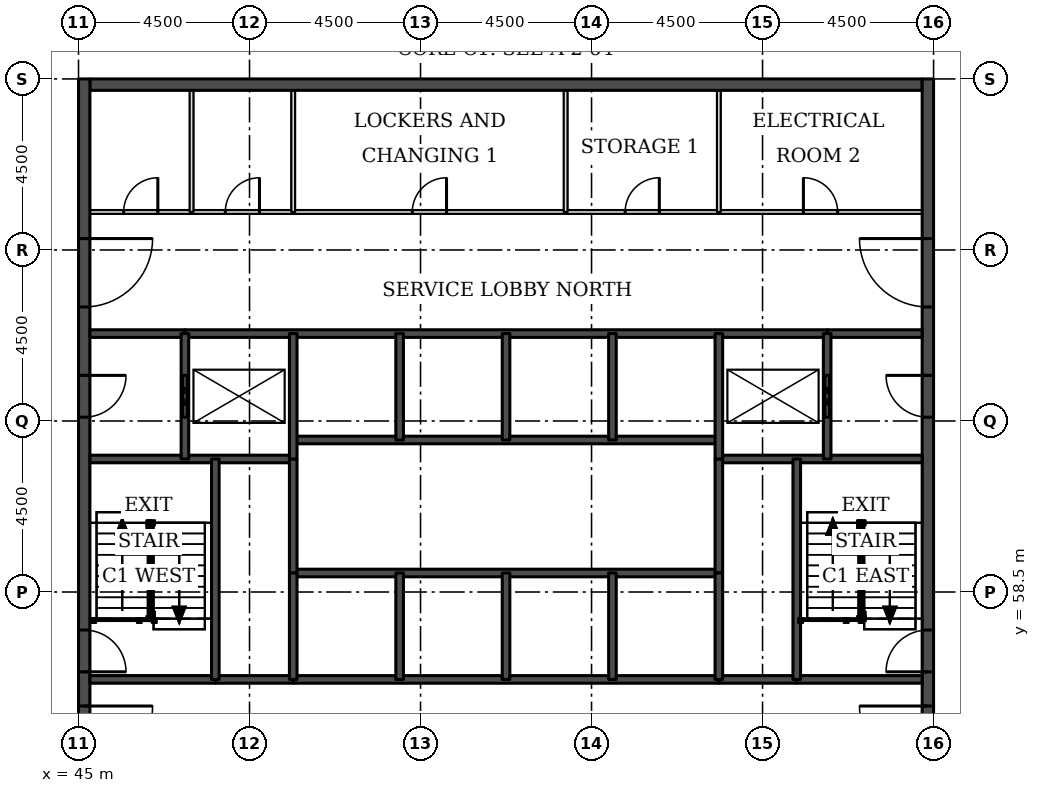
"""IFC4 building model, lengths in metres.
Left out: names, types, materials, properties, quantities, classifications, styles, units other than length and angle.
Written with IfcOpenShell. Run it as: python <this file> out.ifc"""

import sys

from ifc_helpers import new_model, si_unit, direction, frame, frame_2d, origin, place, context, subcontext, project, spatial, rectangle, extrude, element, fill, save


model = new_model("IFC4")
c1 = context("Model", 3, precision=1e-05, world=origin(), true_north=direction((0.0, 1.0)))
c2 = subcontext(c1, "Body", "Model", "MODEL_VIEW")
j1 = project(units=[si_unit("LENGTHUNIT", "METRE"), si_unit("PLANEANGLEUNIT", "RADIAN")], contexts=[c1])
p1 = place(None, origin())
s1 = spatial("IfcSite", under=j1, at=p1, CompositionType="ELEMENT")
p2 = place(p1, origin())
s2 = spatial("IfcBuilding", under=s1, at=p2, CompositionType="ELEMENT")
p3 = place(p2, frame((0.0, 0.0, 263.7)))
s3 = spatial("IfcBuildingStorey", under=s2, at=p3, CompositionType="ELEMENT", Elevation=263.7)
p4 = place(p3, frame((45.3, 71.85, 0.0), z_axis=(0.0, 0.0, 1.0), x_axis=(1.0, 0.0, 0.0)))
e1 = element("IfcWall", 1, at=p4, inside=s3, PredefinedType="SHEAR", context=c2, shape_type="SweptSolid", body=[
    extrude(rectangle(XDim=21.9, YDim=0.3, at=frame_2d((10.95, 0.0))), origin(), (0.0, 0.0, 1.0), 5.0),
])
p5 = place(p3, frame((45.15, 49.5, 0.0), z_axis=(0.0, 0.0, 1.0), x_axis=(0.0, 1.0, 0.0)))
e2 = element("IfcWall", 2, at=p5, inside=s3, PredefinedType="SHEAR", context=c2, shape_type="SweptSolid", body=[
    extrude(rectangle(XDim=22.5, YDim=0.3, at=frame_2d((11.25, 0.0))), origin(), (0.0, 0.0, 1.0), 5.0),
])
p6 = place(p5, frame((4.2, 0.0, 0.0)))
e3 = element("IfcOpeningElement", 3, at=p6, cuts=e2, PredefinedType="OPENING", context=c2, shape_type="SweptSolid", body=[
    extrude(rectangle(XDim=1.8, YDim=2.1, at=frame_2d((0.9, 1.05))), frame((0.0, 0.16, 0.0), z_axis=(0.0, -1.0, 0.0), x_axis=(1.0, 0.0, 0.0)), (0.0, 0.0, 1.0), 0.32),
])
p7 = place(p5, frame((6.9, 0.0, 0.0)))
e4 = element("IfcOpeningElement", 4, at=p7, cuts=e2, PredefinedType="OPENING", context=c2, shape_type="SweptSolid", body=[
    extrude(rectangle(XDim=1.1, YDim=2.1, at=frame_2d((0.55, 1.05))), frame((0.0, 0.16, 0.0), z_axis=(0.0, -1.0, 0.0), x_axis=(1.0, 0.0, 0.0)), (0.0, 0.0, 1.0), 0.32),
])
p8 = place(p5, frame((13.6, 0.0, 0.0)))
e5 = element("IfcOpeningElement", 5, at=p8, cuts=e2, PredefinedType="OPENING", context=c2, shape_type="SweptSolid", body=[
    extrude(rectangle(XDim=1.1, YDim=2.1, at=frame_2d((0.55, 1.05))), frame((0.0, 0.16, 0.0), z_axis=(0.0, -1.0, 0.0), x_axis=(1.0, 0.0, 0.0)), (0.0, 0.0, 1.0), 0.32),
])
p9 = place(p5, frame((16.5, 0.0, 0.0)))
e6 = element("IfcOpeningElement", 6, at=p9, cuts=e2, PredefinedType="OPENING", context=c2, shape_type="SweptSolid", body=[
    extrude(rectangle(XDim=1.8, YDim=2.1, at=frame_2d((0.9, 1.05))), frame((0.0, 0.16, 0.0), z_axis=(0.0, -1.0, 0.0), x_axis=(1.0, 0.0, 0.0)), (0.0, 0.0, 1.0), 0.32),
])
p10 = place(p3, frame((67.35, 49.5, 0.0), z_axis=(0.0, 0.0, 1.0), x_axis=(0.0, 1.0, 0.0)))
e7 = element("IfcWall", 7, at=p10, inside=s3, PredefinedType="SHEAR", context=c2, shape_type="SweptSolid", body=[
    extrude(rectangle(XDim=22.5, YDim=0.3, at=frame_2d((11.25, 0.0))), origin(), (0.0, 0.0, 1.0), 5.0),
])
p11 = place(p10, frame((4.2, 0.0, 0.0)))
e8 = element("IfcOpeningElement", 8, at=p11, cuts=e7, PredefinedType="OPENING", context=c2, shape_type="SweptSolid", body=[
    extrude(rectangle(XDim=1.8, YDim=2.1, at=frame_2d((0.9, 1.05))), frame((0.0, 0.16, 0.0), z_axis=(0.0, -1.0, 0.0), x_axis=(1.0, 0.0, 0.0)), (0.0, 0.0, 1.0), 0.32),
])
p12 = place(p10, frame((6.9, 0.0, 0.0)))
e9 = element("IfcOpeningElement", 9, at=p12, cuts=e7, PredefinedType="OPENING", context=c2, shape_type="SweptSolid", body=[
    extrude(rectangle(XDim=1.1, YDim=2.1, at=frame_2d((0.55, 1.05))), frame((0.0, 0.16, 0.0), z_axis=(0.0, -1.0, 0.0), x_axis=(1.0, 0.0, 0.0)), (0.0, 0.0, 1.0), 0.32),
])
p13 = place(p10, frame((13.6, 0.0, 0.0)))
e10 = element("IfcOpeningElement", 10, at=p13, cuts=e7, PredefinedType="OPENING", context=c2, shape_type="SweptSolid", body=[
    extrude(rectangle(XDim=1.1, YDim=2.1, at=frame_2d((0.55, 1.05))), frame((0.0, 0.16, 0.0), z_axis=(0.0, -1.0, 0.0), x_axis=(1.0, 0.0, 0.0)), (0.0, 0.0, 1.0), 0.32),
])
p14 = place(p10, frame((16.5, 0.0, 0.0)))
e11 = element("IfcOpeningElement", 11, at=p14, cuts=e7, PredefinedType="OPENING", context=c2, shape_type="SweptSolid", body=[
    extrude(rectangle(XDim=1.8, YDim=2.1, at=frame_2d((0.9, 1.05))), frame((0.0, 0.16, 0.0), z_axis=(0.0, -1.0, 0.0), x_axis=(1.0, 0.0, 0.0)), (0.0, 0.0, 1.0), 0.32),
])
for number, where, z_axis, x_axis in (
    (12, (48.6, 56.2, 0.0), (0.0, 0.0, 1.0), (1.0, 0.0, 0.0)),
    (13, (61.85, 56.2, 0.0), (0.0, 0.0, 1.0), (1.0, 0.0, 0.0)),
):
    element("IfcWall", number, at=place(p3, frame(where, z_axis=z_axis, x_axis=x_axis)), inside=s3, PredefinedType="SOLIDWALL", context=c2, shape_type="SweptSolid", body=[
        extrude(rectangle(XDim=2.05, YDim=0.2, at=frame_2d((1.025, 0.0))), origin(), (0.0, 0.0, 1.0), 4.75),
    ])
p15 = place(p3, frame((45.3, 56.2, 0.0), z_axis=(0.0, 0.0, 1.0), x_axis=(1.0, 0.0, 0.0)))
e14 = element("IfcWall", 14, at=p15, inside=s3, PredefinedType="SOLIDWALL", context=c2, shape_type="SweptSolid", body=[
    extrude(rectangle(XDim=3.3, YDim=0.2, at=frame_2d((1.65, 0.0))), origin(), (0.0, 0.0, 1.0), 4.75),
])
p16 = place(p3, frame((50.65, 56.2, 0.0), z_axis=(0.0, 0.0, 1.0), x_axis=(1.0, 0.0, 0.0)))
e15 = element("IfcWall", 15, at=p16, inside=s3, PredefinedType="SOLIDWALL", context=c2, shape_type="SweptSolid", body=[
    extrude(rectangle(XDim=11.2, YDim=0.2, at=frame_2d((5.6, 0.0))), origin(), (0.0, 0.0, 1.0), 4.75),
])
p17 = place(p3, frame((63.9, 56.2, 0.0), z_axis=(0.0, 0.0, 1.0), x_axis=(1.0, 0.0, 0.0)))
e16 = element("IfcWall", 16, at=p17, inside=s3, PredefinedType="SOLIDWALL", context=c2, shape_type="SweptSolid", body=[
    extrude(rectangle(XDim=3.3, YDim=0.2, at=frame_2d((1.65, 0.0))), origin(), (0.0, 0.0, 1.0), 4.75),
])
p18 = place(p3, frame((50.65, 59.0, 0.0), z_axis=(0.0, 0.0, 1.0), x_axis=(1.0, 0.0, 0.0)))
e17 = element("IfcWall", 17, at=p18, inside=s3, PredefinedType="SOLIDWALL", context=c2, shape_type="SweptSolid", body=[
    extrude(rectangle(XDim=11.2, YDim=0.2, at=frame_2d((5.6, 0.0))), origin(), (0.0, 0.0, 1.0), 4.75),
])
for number, where, z_axis, x_axis in (
    (18, (45.3, 62.0, 0.0), (0.0, 0.0, 1.0), (1.0, 0.0, 0.0)),
    (19, (61.85, 62.0, 0.0), (0.0, 0.0, 1.0), (1.0, 0.0, 0.0)),
):
    element("IfcWall", number, at=place(p3, frame(where, z_axis=z_axis, x_axis=x_axis)), inside=s3, PredefinedType="SOLIDWALL", context=c2, shape_type="SweptSolid", body=[
        extrude(rectangle(XDim=5.35, YDim=0.2, at=frame_2d((2.675, 0.0))), origin(), (0.0, 0.0, 1.0), 4.75),
    ])
p19 = place(p3, frame((50.65, 62.5, 0.0), z_axis=(0.0, 0.0, 1.0), x_axis=(1.0, 0.0, 0.0)))
e20 = element("IfcWall", 20, at=p19, inside=s3, PredefinedType="SOLIDWALL", context=c2, shape_type="SweptSolid", body=[
    extrude(rectangle(XDim=11.2, YDim=0.2, at=frame_2d((5.6, 0.0))), origin(), (0.0, 0.0, 1.0), 4.75),
])
for number, where, z_axis, x_axis in (
    (21, (45.3, 65.3, 0.0), (0.0, 0.0, 1.0), (1.0, 0.0, 0.0)),
    (22, (64.7, 65.3, 0.0), (0.0, 0.0, 1.0), (1.0, 0.0, 0.0)),
):
    element("IfcWall", number, at=place(p3, frame(where, z_axis=z_axis, x_axis=x_axis)), inside=s3, PredefinedType="SOLIDWALL", context=c2, shape_type="SweptSolid", body=[
        extrude(rectangle(XDim=2.5, YDim=0.2, at=frame_2d((1.25, 0.0))), origin(), (0.0, 0.0, 1.0), 4.75),
    ])
p20 = place(p3, frame((47.8, 65.3, 0.0), z_axis=(0.0, 0.0, 1.0), x_axis=(1.0, 0.0, 0.0)))
e23 = element("IfcWall", 23, at=p20, inside=s3, PredefinedType="SOLIDWALL", context=c2, shape_type="SweptSolid", body=[
    extrude(rectangle(XDim=16.9, YDim=0.2, at=frame_2d((8.45, 0.0))), origin(), (0.0, 0.0, 1.0), 4.75),
])
p21 = place(p3, frame((45.3, 68.5, 0.0), z_axis=(0.0, 0.0, 1.0), x_axis=(1.0, 0.0, 0.0)))
e24 = element("IfcWall", 24, at=p21, inside=s3, PredefinedType="PARTITIONING", context=c2, shape_type="SweptSolid", body=[
    extrude(rectangle(XDim=21.9, YDim=0.1, at=frame_2d((10.95, 0.0))), origin(), (0.0, 0.0, 1.0), 4.75),
])
p22 = place(p21, frame((18.775, 0.0, 0.0)))
e25 = element("IfcOpeningElement", 25, at=p22, cuts=e24, PredefinedType="OPENING", context=c2, shape_type="SweptSolid", body=[
    extrude(rectangle(XDim=0.9, YDim=2.1, at=frame_2d((0.45, 1.05))), frame((0.0, 0.06, 0.0), z_axis=(0.0, -1.0, 0.0), x_axis=(1.0, 0.0, 0.0)), (0.0, 0.0, 1.0), 0.12),
])
p23 = place(p21, frame((0.887, 0.0, 0.0)))
e26 = element("IfcOpeningElement", 26, at=p23, cuts=e24, PredefinedType="OPENING", context=c2, shape_type="SweptSolid", body=[
    extrude(rectangle(XDim=0.9, YDim=2.1, at=frame_2d((0.45, 1.05))), frame((0.0, 0.06, 0.0), z_axis=(0.0, -1.0, 0.0), x_axis=(1.0, 0.0, 0.0)), (0.0, 0.0, 1.0), 0.12),
])
p24 = place(p21, frame((3.562, 0.0, 0.0)))
e27 = element("IfcOpeningElement", 27, at=p24, cuts=e24, PredefinedType="OPENING", context=c2, shape_type="SweptSolid", body=[
    extrude(rectangle(XDim=0.9, YDim=2.1, at=frame_2d((0.45, 1.05))), frame((0.0, 0.06, 0.0), z_axis=(0.0, -1.0, 0.0), x_axis=(1.0, 0.0, 0.0)), (0.0, 0.0, 1.0), 0.12),
])
p25 = place(p21, frame((14.084, 0.0, 0.0)))
e28 = element("IfcOpeningElement", 28, at=p25, cuts=e24, PredefinedType="OPENING", context=c2, shape_type="SweptSolid", body=[
    extrude(rectangle(XDim=0.9, YDim=2.1, at=frame_2d((0.45, 1.05))), frame((0.0, 0.06, 0.0), z_axis=(0.0, -1.0, 0.0), x_axis=(1.0, 0.0, 0.0)), (0.0, 0.0, 1.0), 0.12),
])
p26 = place(p21, frame((8.484, 0.0, 0.0)))
e29 = element("IfcOpeningElement", 29, at=p26, cuts=e24, PredefinedType="OPENING", context=c2, shape_type="SweptSolid", body=[
    extrude(rectangle(XDim=0.9, YDim=2.1, at=frame_2d((0.45, 1.05))), frame((0.0, 0.06, 0.0), z_axis=(0.0, -1.0, 0.0), x_axis=(1.0, 0.0, 0.0)), (0.0, 0.0, 1.0), 0.12),
])
p27 = place(p3, frame((47.8, 62.0, 0.0), z_axis=(0.0, 0.0, 1.0), x_axis=(0.0, 1.0, 0.0)))
e30 = element("IfcWall", 30, at=p27, inside=s3, PredefinedType="SOLIDWALL", context=c2, shape_type="SweptSolid", body=[
    extrude(rectangle(XDim=3.3, YDim=0.2, at=frame_2d((1.65, 0.0))), origin(), (0.0, 0.0, 1.0), 4.75),
])
p28 = place(p27, frame((1.1, 0.0, 0.0)))
e31 = element("IfcOpeningElement", 31, at=p28, cuts=e30, PredefinedType="OPENING", context=c2, shape_type="SweptSolid", body=[
    extrude(rectangle(XDim=1.1, YDim=2.1, at=frame_2d((0.55, 1.05))), frame((0.0, 0.11, 0.0), z_axis=(0.0, -1.0, 0.0), x_axis=(1.0, 0.0, 0.0)), (0.0, 0.0, 1.0), 0.22),
])
p29 = place(p3, frame((47.975, 68.5, 0.0), z_axis=(0.0, 0.0, 1.0), x_axis=(0.0, 1.0, 0.0)))
e32 = element("IfcWall", 32, at=p29, inside=s3, PredefinedType="PARTITIONING", context=c2, shape_type="SweptSolid", body=[
    extrude(rectangle(XDim=3.2, YDim=0.1, at=frame_2d((1.6, 0.0))), origin(), (0.0, 0.0, 1.0), 4.75),
])
p30 = place(p3, frame((48.6, 56.2, 0.0), z_axis=(0.0, 0.0, 1.0), x_axis=(0.0, 1.0, 0.0)))
e33 = element("IfcWall", 33, at=p30, inside=s3, PredefinedType="SOLIDWALL", context=c2, shape_type="SweptSolid", body=[
    extrude(rectangle(XDim=5.8, YDim=0.2, at=frame_2d((2.9, 0.0))), origin(), (0.0, 0.0, 1.0), 4.75),
])
p31 = place(p3, frame((50.65, 68.5, 0.0), z_axis=(0.0, 0.0, 1.0), x_axis=(0.0, 1.0, 0.0)))
e34 = element("IfcWall", 34, at=p31, inside=s3, PredefinedType="PARTITIONING", context=c2, shape_type="SweptSolid", body=[
    extrude(rectangle(XDim=3.2, YDim=0.1, at=frame_2d((1.6, 0.0))), origin(), (0.0, 0.0, 1.0), 4.75),
])
p32 = place(p3, frame((50.65, 59.0, 0.0), z_axis=(0.0, 0.0, 1.0), x_axis=(0.0, 1.0, 0.0)))
e35 = element("IfcWall", 35, at=p32, inside=s3, PredefinedType="SOLIDWALL", context=c2, shape_type="SweptSolid", body=[
    extrude(rectangle(XDim=3.0, YDim=0.2, at=frame_2d((1.5, 0.0))), origin(), (0.0, 0.0, 1.0), 4.75),
])
p33 = place(p3, frame((50.65, 56.2, 0.0), z_axis=(0.0, 0.0, 1.0), x_axis=(0.0, 1.0, 0.0)))
e36 = element("IfcWall", 36, at=p33, inside=s3, PredefinedType="SOLIDWALL", context=c2, shape_type="SweptSolid", body=[
    extrude(rectangle(XDim=2.8, YDim=0.2, at=frame_2d((1.4, 0.0))), origin(), (0.0, 0.0, 1.0), 4.75),
])
p34 = place(p3, frame((50.65, 62.0, 0.0), z_axis=(0.0, 0.0, 1.0), x_axis=(0.0, 1.0, 0.0)))
e37 = element("IfcWall", 37, at=p34, inside=s3, PredefinedType="SOLIDWALL", context=c2, shape_type="SweptSolid", body=[
    extrude(rectangle(XDim=3.3, YDim=0.2, at=frame_2d((1.65, 0.0))), origin(), (0.0, 0.0, 1.0), 4.75),
])
for number, where, z_axis, x_axis in (
    (38, (53.45, 56.2, 0.0), (0.0, 0.0, 1.0), (0.0, 1.0, 0.0)),
    (39, (53.45, 62.5, 0.0), (0.0, 0.0, 1.0), (0.0, 1.0, 0.0)),
    (40, (56.25, 56.2, 0.0), (0.0, 0.0, 1.0), (0.0, 1.0, 0.0)),
    (41, (56.25, 62.5, 0.0), (0.0, 0.0, 1.0), (0.0, 1.0, 0.0)),
):
    element("IfcWall", number, at=place(p3, frame(where, z_axis=z_axis, x_axis=x_axis)), inside=s3, PredefinedType="SOLIDWALL", context=c2, shape_type="SweptSolid", body=[
        extrude(rectangle(XDim=2.8, YDim=0.2, at=frame_2d((1.4, 0.0))), origin(), (0.0, 0.0, 1.0), 4.75),
    ])
p35 = place(p3, frame((57.818, 68.5, 0.0), z_axis=(0.0, 0.0, 1.0), x_axis=(0.0, 1.0, 0.0)))
e42 = element("IfcWall", 42, at=p35, inside=s3, PredefinedType="PARTITIONING", context=c2, shape_type="SweptSolid", body=[
    extrude(rectangle(XDim=3.2, YDim=0.1, at=frame_2d((1.6, 0.0))), origin(), (0.0, 0.0, 1.0), 4.75),
])
for number, where, z_axis, x_axis in (
    (43, (59.05, 56.2, 0.0), (0.0, 0.0, 1.0), (0.0, 1.0, 0.0)),
    (44, (59.05, 62.5, 0.0), (0.0, 0.0, 1.0), (0.0, 1.0, 0.0)),
):
    element("IfcWall", number, at=place(p3, frame(where, z_axis=z_axis, x_axis=x_axis)), inside=s3, PredefinedType="SOLIDWALL", context=c2, shape_type="SweptSolid", body=[
        extrude(rectangle(XDim=2.8, YDim=0.2, at=frame_2d((1.4, 0.0))), origin(), (0.0, 0.0, 1.0), 4.75),
    ])
p36 = place(p3, frame((61.85, 68.5, 0.0), z_axis=(0.0, 0.0, 1.0), x_axis=(0.0, 1.0, 0.0)))
e45 = element("IfcWall", 45, at=p36, inside=s3, PredefinedType="PARTITIONING", context=c2, shape_type="SweptSolid", body=[
    extrude(rectangle(XDim=3.2, YDim=0.1, at=frame_2d((1.6, 0.0))), origin(), (0.0, 0.0, 1.0), 4.75),
])
p37 = place(p3, frame((61.85, 59.0, 0.0), z_axis=(0.0, 0.0, 1.0), x_axis=(0.0, 1.0, 0.0)))
e46 = element("IfcWall", 46, at=p37, inside=s3, PredefinedType="SOLIDWALL", context=c2, shape_type="SweptSolid", body=[
    extrude(rectangle(XDim=3.0, YDim=0.2, at=frame_2d((1.5, 0.0))), origin(), (0.0, 0.0, 1.0), 4.75),
])
p38 = place(p3, frame((61.85, 56.2, 0.0), z_axis=(0.0, 0.0, 1.0), x_axis=(0.0, 1.0, 0.0)))
e47 = element("IfcWall", 47, at=p38, inside=s3, PredefinedType="SOLIDWALL", context=c2, shape_type="SweptSolid", body=[
    extrude(rectangle(XDim=2.8, YDim=0.2, at=frame_2d((1.4, 0.0))), origin(), (0.0, 0.0, 1.0), 4.75),
])
p39 = place(p3, frame((61.85, 62.0, 0.0), z_axis=(0.0, 0.0, 1.0), x_axis=(0.0, 1.0, 0.0)))
e48 = element("IfcWall", 48, at=p39, inside=s3, PredefinedType="SOLIDWALL", context=c2, shape_type="SweptSolid", body=[
    extrude(rectangle(XDim=3.3, YDim=0.2, at=frame_2d((1.65, 0.0))), origin(), (0.0, 0.0, 1.0), 4.75),
])
p40 = place(p3, frame((63.9, 56.2, 0.0), z_axis=(0.0, 0.0, 1.0), x_axis=(0.0, 1.0, 0.0)))
e49 = element("IfcWall", 49, at=p40, inside=s3, PredefinedType="SOLIDWALL", context=c2, shape_type="SweptSolid", body=[
    extrude(rectangle(XDim=5.8, YDim=0.2, at=frame_2d((2.9, 0.0))), origin(), (0.0, 0.0, 1.0), 4.75),
])
p41 = place(p3, frame((64.7, 62.0, 0.0), z_axis=(0.0, 0.0, 1.0), x_axis=(0.0, 1.0, 0.0)))
e50 = element("IfcWall", 50, at=p41, inside=s3, PredefinedType="SOLIDWALL", context=c2, shape_type="SweptSolid", body=[
    extrude(rectangle(XDim=3.3, YDim=0.2, at=frame_2d((1.65, 0.0))), origin(), (0.0, 0.0, 1.0), 4.75),
])
p42 = place(p41, frame((1.1, 0.0, 0.0)))
e51 = element("IfcOpeningElement", 51, at=p42, cuts=e50, PredefinedType="OPENING", context=c2, shape_type="SweptSolid", body=[
    extrude(rectangle(XDim=1.1, YDim=2.1, at=frame_2d((0.55, 1.05))), frame((0.0, 0.11, 0.0), z_axis=(0.0, -1.0, 0.0), x_axis=(1.0, 0.0, 0.0)), (0.0, 0.0, 1.0), 0.22),
])
p43 = place(p28, origin())
e52 = element("IfcDoor", 52, at=p43, inside=s3, OperationType="DOUBLE_DOOR_SLIDING", PredefinedType="DOOR", context=c2, shape_type="SweptSolid", body=[
    extrude(rectangle(XDim=1.1, YDim=2.1, at=frame_2d((0.55, 1.05))), frame((0.0, 0.025, 0.0), z_axis=(0.0, -1.0, 0.0), x_axis=(1.0, 0.0, 0.0)), (0.0, 0.0, 1.0), 0.05),
])
fill(e31, e52)
p44 = place(p42, origin())
e53 = element("IfcDoor", 53, at=p44, inside=s3, OperationType="DOUBLE_DOOR_SLIDING", PredefinedType="DOOR", context=c2, shape_type="SweptSolid", body=[
    extrude(rectangle(XDim=1.1, YDim=2.1, at=frame_2d((0.55, 1.05))), frame((0.0, 0.025, 0.0), z_axis=(0.0, -1.0, 0.0), x_axis=(1.0, 0.0, 0.0)), (0.0, 0.0, 1.0), 0.05),
])
fill(e51, e53)
p45 = place(p6, frame((1.8, 0.0, 0.0), z_axis=(0.0, 0.0, 1.0), x_axis=(-1.0, 0.0, 0.0)))
e54 = element("IfcDoor", 54, at=p45, inside=s3, OperationType="SINGLE_SWING_LEFT", PredefinedType="DOOR", context=c2, shape_type="SweptSolid", body=[
    extrude(rectangle(XDim=1.8, YDim=2.1, at=frame_2d((0.9, 1.05))), frame((0.0, 0.025, 0.0), z_axis=(0.0, -1.0, 0.0), x_axis=(1.0, 0.0, 0.0)), (0.0, 0.0, 1.0), 0.05),
])
fill(e3, e54)
p46 = place(p7, frame((1.1, 0.0, 0.0), z_axis=(0.0, 0.0, 1.0), x_axis=(-1.0, 0.0, 0.0)))
e55 = element("IfcDoor", 55, at=p46, inside=s3, OperationType="SINGLE_SWING_RIGHT", PredefinedType="DOOR", context=c2, shape_type="SweptSolid", body=[
    extrude(rectangle(XDim=1.1, YDim=2.1, at=frame_2d((0.55, 1.05))), frame((0.0, 0.025, 0.0), z_axis=(0.0, -1.0, 0.0), x_axis=(1.0, 0.0, 0.0)), (0.0, 0.0, 1.0), 0.05),
])
fill(e4, e55)
p47 = place(p8, frame((1.1, 0.0, 0.0), z_axis=(0.0, 0.0, 1.0), x_axis=(-1.0, 0.0, 0.0)))
e56 = element("IfcDoor", 56, at=p47, inside=s3, OperationType="SINGLE_SWING_LEFT", PredefinedType="DOOR", context=c2, shape_type="SweptSolid", body=[
    extrude(rectangle(XDim=1.1, YDim=2.1, at=frame_2d((0.55, 1.05))), frame((0.0, 0.025, 0.0), z_axis=(0.0, -1.0, 0.0), x_axis=(1.0, 0.0, 0.0)), (0.0, 0.0, 1.0), 0.05),
])
fill(e5, e56)
p48 = place(p9, frame((1.8, 0.0, 0.0), z_axis=(0.0, 0.0, 1.0), x_axis=(-1.0, 0.0, 0.0)))
e57 = element("IfcDoor", 57, at=p48, inside=s3, OperationType="SINGLE_SWING_LEFT", PredefinedType="DOOR", context=c2, shape_type="SweptSolid", body=[
    extrude(rectangle(XDim=1.8, YDim=2.1, at=frame_2d((0.9, 1.05))), frame((0.0, 0.025, 0.0), z_axis=(0.0, -1.0, 0.0), x_axis=(1.0, 0.0, 0.0)), (0.0, 0.0, 1.0), 0.05),
])
fill(e6, e57)
p49 = place(p11, origin())
e58 = element("IfcDoor", 58, at=p49, inside=s3, OperationType="SINGLE_SWING_RIGHT", PredefinedType="DOOR", context=c2, shape_type="SweptSolid", body=[
    extrude(rectangle(XDim=1.8, YDim=2.1, at=frame_2d((0.9, 1.05))), frame((0.0, 0.025, 0.0), z_axis=(0.0, -1.0, 0.0), x_axis=(1.0, 0.0, 0.0)), (0.0, 0.0, 1.0), 0.05),
])
fill(e8, e58)
p50 = place(p12, origin())
e59 = element("IfcDoor", 59, at=p50, inside=s3, OperationType="SINGLE_SWING_LEFT", PredefinedType="DOOR", context=c2, shape_type="SweptSolid", body=[
    extrude(rectangle(XDim=1.1, YDim=2.1, at=frame_2d((0.55, 1.05))), frame((0.0, 0.025, 0.0), z_axis=(0.0, -1.0, 0.0), x_axis=(1.0, 0.0, 0.0)), (0.0, 0.0, 1.0), 0.05),
])
fill(e9, e59)
p51 = place(p13, origin())
e60 = element("IfcDoor", 60, at=p51, inside=s3, OperationType="SINGLE_SWING_RIGHT", PredefinedType="DOOR", context=c2, shape_type="SweptSolid", body=[
    extrude(rectangle(XDim=1.1, YDim=2.1, at=frame_2d((0.55, 1.05))), frame((0.0, 0.025, 0.0), z_axis=(0.0, -1.0, 0.0), x_axis=(1.0, 0.0, 0.0)), (0.0, 0.0, 1.0), 0.05),
])
fill(e10, e60)
p52 = place(p14, origin())
e61 = element("IfcDoor", 61, at=p52, inside=s3, OperationType="SINGLE_SWING_RIGHT", PredefinedType="DOOR", context=c2, shape_type="SweptSolid", body=[
    extrude(rectangle(XDim=1.8, YDim=2.1, at=frame_2d((0.9, 1.05))), frame((0.0, 0.025, 0.0), z_axis=(0.0, -1.0, 0.0), x_axis=(1.0, 0.0, 0.0)), (0.0, 0.0, 1.0), 0.05),
])
fill(e11, e61)
p53 = place(p22, origin())
e62 = element("IfcDoor", 62, at=p53, inside=s3, OperationType="SINGLE_SWING_LEFT", PredefinedType="DOOR", context=c2, shape_type="SweptSolid", body=[
    extrude(rectangle(XDim=0.9, YDim=2.1, at=frame_2d((0.45, 1.05))), frame((0.0, 0.025, 0.0), z_axis=(0.0, -1.0, 0.0), x_axis=(1.0, 0.0, 0.0)), (0.0, 0.0, 1.0), 0.05),
])
fill(e25, e62)
p54 = place(p23, origin())
e63 = element("IfcDoor", 63, at=p54, inside=s3, OperationType="SINGLE_SWING_RIGHT", PredefinedType="DOOR", context=c2, shape_type="SweptSolid", body=[
    extrude(rectangle(XDim=0.9, YDim=2.1, at=frame_2d((0.45, 1.05))), frame((0.0, 0.025, 0.0), z_axis=(0.0, -1.0, 0.0), x_axis=(1.0, 0.0, 0.0)), (0.0, 0.0, 1.0), 0.05),
])
fill(e26, e63)
p55 = place(p24, origin())
e64 = element("IfcDoor", 64, at=p55, inside=s3, OperationType="SINGLE_SWING_RIGHT", PredefinedType="DOOR", context=c2, shape_type="SweptSolid", body=[
    extrude(rectangle(XDim=0.9, YDim=2.1, at=frame_2d((0.45, 1.05))), frame((0.0, 0.025, 0.0), z_axis=(0.0, -1.0, 0.0), x_axis=(1.0, 0.0, 0.0)), (0.0, 0.0, 1.0), 0.05),
])
fill(e27, e64)
p56 = place(p25, origin())
e65 = element("IfcDoor", 65, at=p56, inside=s3, OperationType="SINGLE_SWING_RIGHT", PredefinedType="DOOR", context=c2, shape_type="SweptSolid", body=[
    extrude(rectangle(XDim=0.9, YDim=2.1, at=frame_2d((0.45, 1.05))), frame((0.0, 0.025, 0.0), z_axis=(0.0, -1.0, 0.0), x_axis=(1.0, 0.0, 0.0)), (0.0, 0.0, 1.0), 0.05),
])
fill(e28, e65)
p57 = place(p26, origin())
e66 = element("IfcDoor", 66, at=p57, inside=s3, OperationType="SINGLE_SWING_RIGHT", PredefinedType="DOOR", context=c2, shape_type="SweptSolid", body=[
    extrude(rectangle(XDim=0.9, YDim=2.1, at=frame_2d((0.45, 1.05))), frame((0.0, 0.025, 0.0), z_axis=(0.0, -1.0, 0.0), x_axis=(1.0, 0.0, 0.0)), (0.0, 0.0, 1.0), 0.05),
])
fill(e29, e66)
save(model, sys.argv[1])
